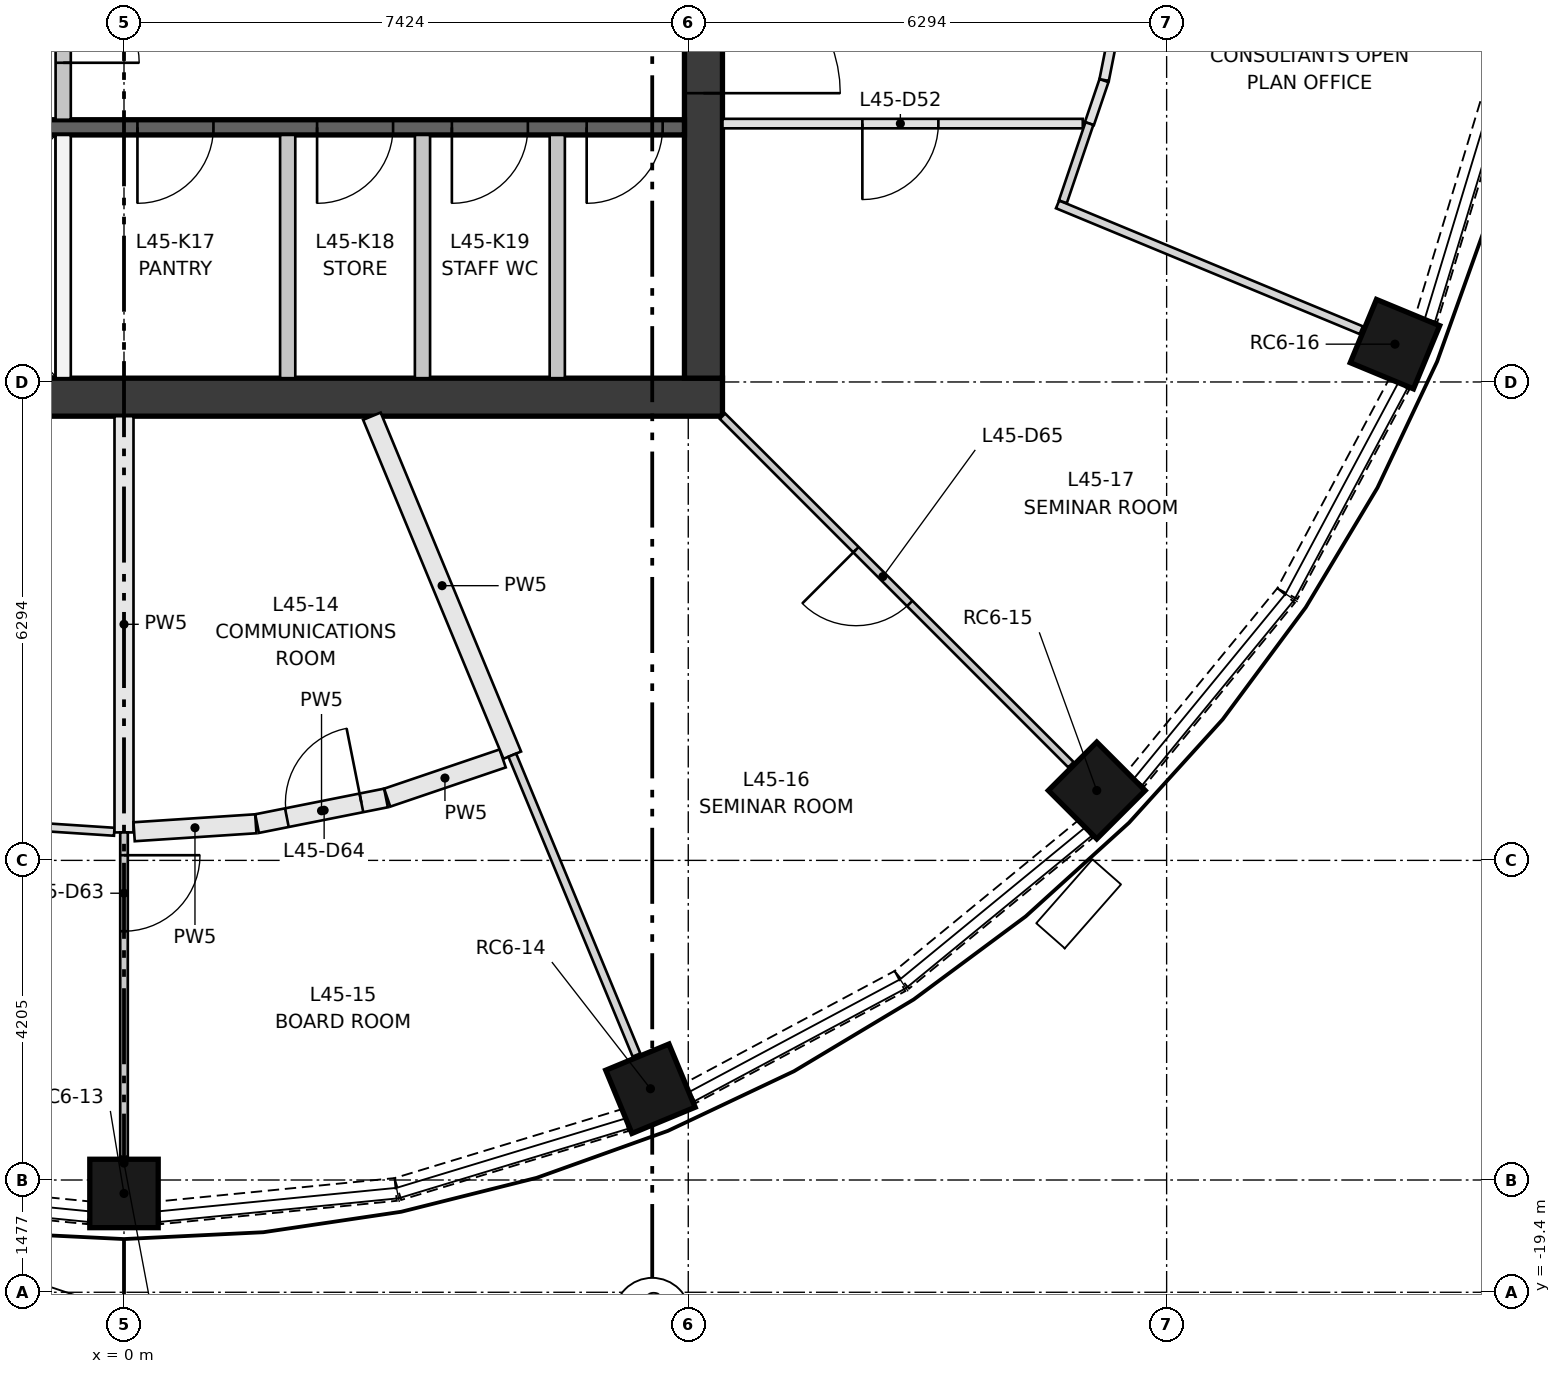
"""IFC4 building model, lengths in metres.
Left out: names, types, materials, properties, quantities, classifications, styles, units other than length and angle.
Written with IfcOpenShell. Run it as: python <this file> out.ifc"""

import sys

from ifc_helpers import new_model, si_unit, direction, frame, frame_2d, origin, origin_2d, place, context, subcontext, project, spatial, rectangle, extrude, element, fill, save


model = new_model("IFC4")
c1 = context("Model", 3, precision=1e-05, world=origin(), true_north=direction((0.0, 1.0)))
c2 = subcontext(c1, "Body", "Model", "MODEL_VIEW")
j1 = project(units=[si_unit("LENGTHUNIT", "METRE"), si_unit("PLANEANGLEUNIT", "RADIAN")], contexts=[c1])
p1 = place(None, origin())
s1 = spatial("IfcSite", under=j1, at=p1, CompositionType="ELEMENT")
p2 = place(p1, origin())
s2 = spatial("IfcBuilding", under=s1, at=p2, CompositionType="ELEMENT")
p3 = place(p2, frame((0.0, 0.0, 170.9)))
s3 = spatial("IfcBuildingStorey", under=s2, at=p3, CompositionType="ELEMENT", Elevation=170.9)
for number, where, z_axis, x_axis in (
    (1, (0.0, -18.1, 0.0), (0.0, 0.0, 1.0), (0.0, -1.0, 0.0)),
    (2, (6.927, -16.722, 0.0), (0.0, 0.0, 1.0), (0.383, -0.924, 0.0)),
    (3, (12.799, -12.799, 0.0), (0.0, 0.0, 1.0), (0.707, -0.707, 0.0)),
    (4, (16.722, -6.927, 0.0), (0.0, 0.0, 1.0), (0.924, -0.383, 0.0)),
):
    element("IfcColumn", number, at=place(p3, frame(where, z_axis=z_axis, x_axis=x_axis)), inside=s3, PredefinedType="COLUMN", context=c2, shape_type="SweptSolid", body=[
        extrude(rectangle(XDim=0.9, YDim=0.9, at=origin_2d()), origin(), (0.0, 0.0, 1.0), 3.35),
    ])
p4 = place(p3, frame((-7.874, -7.624, 0.0), z_axis=(0.0, 0.0, 1.0), x_axis=(1.0, 0.0, 0.0)))
e5 = element("IfcWall", 5, at=p4, inside=s3, PredefinedType="SHEAR", context=c2, shape_type="SweptSolid", body=[
    extrude(rectangle(XDim=15.748, YDim=0.5, at=frame_2d((7.874, 0.0))), origin(), (0.0, 0.0, 1.0), 3.35),
])
p5 = place(p3, frame((7.624, -7.374, 0.0), z_axis=(0.0, 0.0, 1.0), x_axis=(0.0, 1.0, 0.0)))
e6 = element("IfcWall", 6, at=p5, inside=s3, PredefinedType="SHEAR", context=c2, shape_type="SweptSolid", body=[
    extrude(rectangle(XDim=14.748, YDim=0.5, at=frame_2d((7.374, 0.0))), origin(), (0.0, 0.0, 1.0), 3.35),
])
p6 = place(p5, frame((6.874, 0.0, 0.0)))
e7 = element("IfcOpeningElement", 7, at=p6, cuts=e6, PredefinedType="OPENING", context=c2, shape_type="SweptSolid", body=[
    extrude(rectangle(XDim=1.0, YDim=2.1, at=frame_2d((0.5, 1.05))), frame((0.0, 0.26, 0.0), z_axis=(0.0, -1.0, 0.0), x_axis=(1.0, 0.0, 0.0)), (0.0, 0.0, 1.0), 0.52),
])
p7 = place(p5, frame((3.75, 0.0, 0.0)))
e8 = element("IfcOpeningElement", 8, at=p7, cuts=e6, PredefinedType="OPENING", context=c2, shape_type="SweptSolid", body=[
    extrude(rectangle(XDim=1.8, YDim=2.1, at=frame_2d((0.9, 1.05))), frame((0.0, 0.26, 0.0), z_axis=(0.0, -1.0, 0.0), x_axis=(1.0, 0.0, 0.0)), (0.0, 0.0, 1.0), 0.52),
])
p8 = place(p5, frame((9.198, 0.0, 0.0)))
e9 = element("IfcOpeningElement", 9, at=p8, cuts=e6, PredefinedType="OPENING", context=c2, shape_type="SweptSolid", body=[
    extrude(rectangle(XDim=1.8, YDim=2.1, at=frame_2d((0.9, 1.05))), frame((0.0, 0.26, 0.0), z_axis=(0.0, -1.0, 0.0), x_axis=(1.0, 0.0, 0.0)), (0.0, 0.0, 1.0), 0.52),
])
p9 = place(p3, frame((-7.374, -4.074, 0.0), z_axis=(0.0, 0.0, 1.0), x_axis=(1.0, 0.0, 0.0)))
e10 = element("IfcWall", 10, at=p9, inside=s3, PredefinedType="SHEAR", context=c2, shape_type="SweptSolid", body=[
    extrude(rectangle(XDim=14.748, YDim=0.2, at=frame_2d((7.374, 0.0))), origin(), (0.0, 0.0, 1.0), 3.0),
])
p10 = place(p9, frame((1.319, 0.0, 0.0)))
e11 = element("IfcOpeningElement", 11, at=p10, cuts=e10, PredefinedType="OPENING", context=c2, shape_type="SweptSolid", body=[
    extrude(rectangle(XDim=1.1, YDim=2.1, at=frame_2d((0.55, 1.05))), frame((0.0, 0.11, 0.0), z_axis=(0.0, -1.0, 0.0), x_axis=(1.0, 0.0, 0.0)), (0.0, 0.0, 1.0), 0.22),
])
p11 = place(p9, frame((4.456, 0.0, 0.0)))
e12 = element("IfcOpeningElement", 12, at=p11, cuts=e10, PredefinedType="OPENING", context=c2, shape_type="SweptSolid", body=[
    extrude(rectangle(XDim=1.1, YDim=2.1, at=frame_2d((0.55, 1.05))), frame((0.0, 0.11, 0.0), z_axis=(0.0, -1.0, 0.0), x_axis=(1.0, 0.0, 0.0)), (0.0, 0.0, 1.0), 0.22),
])
p12 = place(p9, frame((7.551, 0.0, 0.0)))
e13 = element("IfcOpeningElement", 13, at=p12, cuts=e10, PredefinedType="OPENING", context=c2, shape_type="SweptSolid", body=[
    extrude(rectangle(XDim=1.0, YDim=2.1, at=frame_2d((0.5, 1.05))), frame((0.0, 0.11, 0.0), z_axis=(0.0, -1.0, 0.0), x_axis=(1.0, 0.0, 0.0)), (0.0, 0.0, 1.0), 0.22),
])
p13 = place(p9, frame((9.914, 0.0, 0.0)))
e14 = element("IfcOpeningElement", 14, at=p13, cuts=e10, PredefinedType="OPENING", context=c2, shape_type="SweptSolid", body=[
    extrude(rectangle(XDim=1.0, YDim=2.1, at=frame_2d((0.5, 1.05))), frame((0.0, 0.11, 0.0), z_axis=(0.0, -1.0, 0.0), x_axis=(1.0, 0.0, 0.0)), (0.0, 0.0, 1.0), 0.22),
])
p14 = place(p9, frame((11.688, 0.0, 0.0)))
e15 = element("IfcOpeningElement", 15, at=p14, cuts=e10, PredefinedType="OPENING", context=c2, shape_type="SweptSolid", body=[
    extrude(rectangle(XDim=1.0, YDim=2.1, at=frame_2d((0.5, 1.05))), frame((0.0, 0.11, 0.0), z_axis=(0.0, -1.0, 0.0), x_axis=(1.0, 0.0, 0.0)), (0.0, 0.0, 1.0), 0.22),
])
p15 = place(p9, frame((13.461, 0.0, 0.0)))
e16 = element("IfcOpeningElement", 16, at=p15, cuts=e10, PredefinedType="OPENING", context=c2, shape_type="SweptSolid", body=[
    extrude(rectangle(XDim=1.0, YDim=2.1, at=frame_2d((0.5, 1.05))), frame((0.0, 0.11, 0.0), z_axis=(0.0, -1.0, 0.0), x_axis=(1.0, 0.0, 0.0)), (0.0, 0.0, 1.0), 0.22),
])
p16 = place(p3, frame((-0.8, -7.374, 0.0), z_axis=(0.0, 0.0, 1.0), x_axis=(0.0, 1.0, 0.0)))
e17 = element("IfcWall", 17, at=p16, inside=s3, PredefinedType="PARTITIONING", context=c2, shape_type="SweptSolid", body=[
    extrude(rectangle(XDim=3.2, YDim=0.2, at=frame_2d((1.6, 0.0))), origin(), (0.0, 0.0, 1.0), 3.0),
])
p17 = place(p3, frame((-0.8, -3.974, 0.0), z_axis=(0.0, 0.0, 1.0), x_axis=(0.0, 1.0, 0.0)))
e18 = element("IfcWall", 18, at=p17, inside=s3, PredefinedType="PARTITIONING", context=c2, shape_type="SweptSolid", body=[
    extrude(rectangle(XDim=2.499, YDim=0.2, at=frame_2d((1.25, 0.0))), origin(), (0.0, 0.0, 1.0), 3.0),
])
p18 = place(p17, frame((0.75, 0.0, 0.0)))
e19 = element("IfcOpeningElement", 19, at=p18, cuts=e18, PredefinedType="OPENING", context=c2, shape_type="SweptSolid", body=[
    extrude(rectangle(XDim=1.0, YDim=2.1, at=frame_2d((0.5, 1.05))), frame((0.0, 0.11, 0.0), z_axis=(0.0, -1.0, 0.0), x_axis=(1.0, 0.0, 0.0)), (0.0, 0.0, 1.0), 0.22),
])
for number, where, z_axis, x_axis in (
    (20, (2.154, -7.374, 0.0), (0.0, 0.0, 1.0), (0.0, 1.0, 0.0)),
    (21, (3.927, -7.374, 0.0), (0.0, 0.0, 1.0), (0.0, 1.0, 0.0)),
    (22, (5.7, -7.374, 0.0), (0.0, 0.0, 1.0), (0.0, 1.0, 0.0)),
):
    element("IfcWall", number, at=place(p3, frame(where, z_axis=z_axis, x_axis=x_axis)), inside=s3, PredefinedType="PARTITIONING", context=c2, shape_type="SweptSolid", body=[
        extrude(rectangle(XDim=3.2, YDim=0.2, at=frame_2d((1.6, 0.0))), origin(), (0.0, 0.0, 1.0), 3.0),
    ])
for number, where, z_axis, x_axis in (
    (23, (-3.574, -18.048, 0.0), (0.0, 0.0, 1.0), (0.995, -0.098, 0.0)),
    (24, (0.464, -18.354, 0.0), (0.0, 0.0, 1.0), (0.995, 0.098, 0.0)),
):
    element("IfcWall", number, at=place(p3, frame(where, z_axis=z_axis, x_axis=x_axis)), inside=s3, PredefinedType="SOLIDWALL", context=c2, shape_type="SweptSolid", body=[
        extrude(rectangle(XDim=3.125, YDim=0.3, at=frame_2d((1.563, 0.0))), origin(), (0.0, 0.0, 1.0), 0.9),
    ])
p19 = place(p3, frame((3.604, -18.042, 0.0), z_axis=(0.0, 0.0, 1.0), x_axis=(0.957001416136, 0.290083245834, 0.0)))
e25 = element("IfcWall", 25, at=p19, inside=s3, PredefinedType="SOLIDWALL", context=c2, shape_type="SweptSolid", body=[
    extrude(rectangle(XDim=3.127, YDim=0.3, at=frame_2d((1.563, 0.0))), origin(), (0.0, 0.0, 1.0), 0.9),
])
p20 = place(p3, frame((7.452, -16.779, 0.0), z_axis=(0.0, 0.0, 1.0), x_axis=(0.882024038027, 0.47120441036, 0.0)))
e26 = element("IfcWall", 26, at=p20, inside=s3, PredefinedType="SOLIDWALL", context=c2, shape_type="SweptSolid", body=[
    extrude(rectangle(XDim=3.125, YDim=0.3, at=frame_2d((1.562, 0.0))), origin(), (0.0, 0.0, 1.0), 0.9),
])
for number, where, z_axis, x_axis in (
    (27, (10.234, -15.29, 0.0), (0.0, 0.0, 1.0), (0.773, 0.634, 0.0)),
    (28, (13.306, -12.651, 0.0), (0.0, 0.0, 1.0), (0.634, 0.773, 0.0)),
):
    element("IfcWall", number, at=place(p3, frame(where, z_axis=z_axis, x_axis=x_axis)), inside=s3, PredefinedType="SOLIDWALL", context=c2, shape_type="SweptSolid", body=[
        extrude(rectangle(XDim=3.127, YDim=0.3, at=frame_2d((1.563, 0.0))), origin(), (0.0, 0.0, 1.0), 0.9),
    ])
p21 = place(p3, frame((15.306, -10.209, 0.0), z_axis=(0.0, 0.0, 1.0), x_axis=(0.47120441036, 0.882024038027, 0.0)))
e29 = element("IfcWall", 29, at=p21, inside=s3, PredefinedType="SOLIDWALL", context=c2, shape_type="SweptSolid", body=[
    extrude(rectangle(XDim=3.125, YDim=0.3, at=frame_2d((1.562, 0.0))), origin(), (0.0, 0.0, 1.0), 0.9),
])
p22 = place(p3, frame((17.135, -6.596, 0.0), z_axis=(0.0, 0.0, 1.0), x_axis=(0.290083245834, 0.957001416136, 0.0)))
e30 = element("IfcWall", 30, at=p22, inside=s3, PredefinedType="SOLIDWALL", context=c2, shape_type="SweptSolid", body=[
    extrude(rectangle(XDim=3.127, YDim=0.3, at=frame_2d((1.563, 0.0))), origin(), (0.0, 0.0, 1.0), 0.9),
])
p23 = place(p3, frame((12.615, -4.024, 0.0), z_axis=(0.0, 0.0, 1.0), x_axis=(-1.0, 0.0, 0.0)))
e31 = element("IfcWall", 31, at=p23, inside=s3, PredefinedType="PARTITIONING", context=c2, shape_type="SweptSolid", body=[
    extrude(rectangle(XDim=4.741, YDim=0.125, at=frame_2d((2.37, 0.0))), origin(), (0.0, 0.0, 1.0), 3.0),
])
p24 = place(p23, frame((1.9, 0.0, 0.0)))
e32 = element("IfcOpeningElement", 32, at=p24, cuts=e31, PredefinedType="OPENING", context=c2, shape_type="SweptSolid", body=[
    extrude(rectangle(XDim=1.0, YDim=2.1, at=frame_2d((0.5, 1.05))), frame((0.0, 0.073, 0.0), z_axis=(0.0, -1.0, 0.0), x_axis=(1.0, 0.0, 0.0)), (0.0, 0.0, 1.0), 0.145),
])
p25 = place(p3, frame((12.894, -3.459, 0.0), z_axis=(0.0, 0.0, 1.0), x_axis=(-0.321374914787, -0.946952038989, 0.0)))
e33 = element("IfcWall", 33, at=p25, inside=s3, PredefinedType="PARTITIONING", context=c2, shape_type="SweptSolid", body=[
    extrude(rectangle(XDim=0.597, YDim=0.125, at=frame_2d((0.299, 0.0))), origin(), (0.0, 0.0, 1.0), 3.0),
])
p26 = place(p3, frame((13.235, -1.747, 0.0), z_axis=(0.0, 0.0, 1.0), x_axis=(-0.195116516296, -0.980780069673, 0.0)))
e34 = element("IfcWall", 34, at=p26, inside=s3, PredefinedType="PARTITIONING", context=c2, shape_type="SweptSolid", body=[
    extrude(rectangle(XDim=1.738, YDim=0.125, at=frame_2d((0.869, 0.0))), origin(), (0.0, 0.0, 1.0), 3.0),
])
p27 = place(p3, frame((-0.128, -13.342, 0.0), z_axis=(0.0, 0.0, 1.0), x_axis=(-0.997862773684, 0.065344356258, 0.0)))
e35 = element("IfcWall", 35, at=p27, inside=s3, PredefinedType="PARTITIONING", context=c2, shape_type="SweptSolid", body=[
    extrude(rectangle(XDim=1.614, YDim=0.105, at=frame_2d((0.807, 0.0))), origin(), (0.0, 0.0, 1.0), 3.0),
])
p28 = place(p3, frame((0.0, -7.874, 0.0), z_axis=(0.0, 0.0, 1.0), x_axis=(0.0, -1.0, 0.0)))
e36 = element("IfcWall", 36, at=p28, inside=s3, PredefinedType="PARTITIONING", context=c2, shape_type="SweptSolid", body=[
    extrude(rectangle(XDim=5.476, YDim=0.25, at=frame_2d((2.738, 0.0))), origin(), (0.0, 0.0, 1.0), 3.0),
])
p29 = place(p3, frame((0.0, -13.35, 0.0), z_axis=(0.0, 0.0, 1.0), x_axis=(0.0, -1.0, 0.0)))
e37 = element("IfcWall", 37, at=p29, inside=s3, PredefinedType="PARTITIONING", context=c2, shape_type="SweptSolid", body=[
    extrude(rectangle(XDim=4.27, YDim=0.1, at=frame_2d((2.135, 0.0))), origin(), (0.0, 0.0, 1.0), 3.0),
])
p30 = place(p29, frame((0.3, 0.0, 0.0)))
e38 = element("IfcOpeningElement", 38, at=p30, cuts=e37, PredefinedType="OPENING", context=c2, shape_type="SweptSolid", body=[
    extrude(rectangle(XDim=1.0, YDim=2.1, at=frame_2d((0.5, 1.05))), frame((0.0, 0.06, 0.0), z_axis=(0.0, -1.0, 0.0), x_axis=(1.0, 0.0, 0.0)), (0.0, 0.0, 1.0), 0.12),
])
p31 = place(p3, frame((1.734, -13.236, 0.0), z_axis=(0.0, 0.0, 1.0), x_axis=(-0.997857274773, -0.065428275107, 0.0)))
e39 = element("IfcWall", 39, at=p31, inside=s3, PredefinedType="PARTITIONING", context=c2, shape_type="SweptSolid", body=[
    extrude(rectangle(XDim=1.604, YDim=0.25, at=frame_2d((0.802, 0.0))), origin(), (0.0, 0.0, 1.0), 3.0),
])
p32 = place(p3, frame((1.75, -13.234, 0.0), z_axis=(0.0, 0.0, 1.0), x_axis=(0.98079718542, 0.195030461907, 0.0)))
e40 = element("IfcWall", 40, at=p32, inside=s3, PredefinedType="PARTITIONING", context=c2, shape_type="SweptSolid", body=[
    extrude(rectangle(XDim=1.73, YDim=0.25, at=frame_2d((0.865, 0.0))), origin(), (0.0, 0.0, 1.0), 3.0),
])
p33 = place(p32, frame((0.4, 0.0, 0.0)))
e41 = element("IfcOpeningElement", 41, at=p33, cuts=e40, PredefinedType="OPENING", context=c2, shape_type="SweptSolid", body=[
    extrude(rectangle(XDim=1.0, YDim=2.1, at=frame_2d((0.5, 1.05))), frame((0.0, 0.135, 0.0), z_axis=(0.0, -1.0, 0.0), x_axis=(1.0, 0.0, 0.0)), (0.0, 0.0, 1.0), 0.27),
])
p34 = place(p3, frame((4.982, -12.377, 0.0), z_axis=(0.0, 0.0, 1.0), x_axis=(-0.946919168061, -0.321471754838, 0.0)))
e42 = element("IfcWall", 42, at=p34, inside=s3, PredefinedType="PARTITIONING", context=c2, shape_type="SweptSolid", body=[
    extrude(rectangle(XDim=1.605, YDim=0.25, at=frame_2d((0.802, 0.0))), origin(), (0.0, 0.0, 1.0), 3.0),
])
p35 = place(p3, frame((3.261, -7.874, 0.0), z_axis=(0.0, 0.0, 1.0), x_axis=(0.382707643949, -0.923869503373, 0.0)))
e43 = element("IfcWall", 43, at=p35, inside=s3, PredefinedType="PARTITIONING", context=c2, shape_type="SweptSolid", body=[
    extrude(rectangle(XDim=4.827, YDim=0.25, at=frame_2d((2.414, 0.0))), origin(), (0.0, 0.0, 1.0), 3.0),
])
p36 = place(p3, frame((5.109, -12.334, 0.0), z_axis=(0.0, 0.0, 1.0), x_axis=(0.382669916503, -0.923885130849, 0.0)))
e44 = element("IfcWall", 44, at=p36, inside=s3, PredefinedType="PARTITIONING", context=c2, shape_type="SweptSolid", body=[
    extrude(rectangle(XDim=4.27, YDim=0.11, at=frame_2d((2.135, 0.0))), origin(), (0.0, 0.0, 1.0), 3.0),
])
p37 = place(p3, frame((12.459, -12.459, 0.0), z_axis=(0.0, 0.0, 1.0), x_axis=(-0.707106781187, 0.707106781187, 0.0)))
e45 = element("IfcWall", 45, at=p37, inside=s3, PredefinedType="PARTITIONING", context=c2, shape_type="SweptSolid", body=[
    extrude(rectangle(XDim=6.484, YDim=0.1, at=frame_2d((3.242, 0.0))), origin(), (0.0, 0.0, 1.0), 3.0),
])
p38 = place(p37, frame((3.0, 0.0, 0.0)))
e46 = element("IfcOpeningElement", 46, at=p38, cuts=e45, PredefinedType="OPENING", context=c2, shape_type="SweptSolid", body=[
    extrude(rectangle(XDim=1.0, YDim=2.1, at=frame_2d((0.5, 1.05))), frame((0.0, 0.06, 0.0), z_axis=(0.0, -1.0, 0.0), x_axis=(1.0, 0.0, 0.0)), (0.0, 0.0, 1.0), 0.12),
])
p39 = place(p3, frame((12.283, -5.088, 0.0), z_axis=(0.0, 0.0, 1.0), x_axis=(0.923888181348, -0.382662551559, 0.0)))
e47 = element("IfcWall", 47, at=p39, inside=s3, PredefinedType="PARTITIONING", context=c2, shape_type="SweptSolid", body=[
    extrude(rectangle(XDim=4.325, YDim=0.11, at=frame_2d((2.163, 0.0))), origin(), (0.0, 0.0, 1.0), 3.0),
])
p40 = place(p3, frame((12.702, -4.024, 0.0), z_axis=(0.0, 0.0, 1.0), x_axis=(-0.321346724307, -0.946961605756, 0.0)))
e48 = element("IfcWall", 48, at=p40, inside=s3, PredefinedType="PARTITIONING", context=c2, shape_type="SweptSolid", body=[
    extrude(rectangle(XDim=1.086, YDim=0.11, at=frame_2d((0.543, 0.0))), origin(), (0.0, 0.0, 1.0), 3.0),
])
p41 = place(p18, frame((1.0, 0.0, 0.0), z_axis=(0.0, 0.0, 1.0), x_axis=(-1.0, 0.0, 0.0)))
e49 = element("IfcDoor", 49, at=p41, inside=s3, OperationType="SINGLE_SWING_LEFT", PredefinedType="DOOR", context=c2, shape_type="SweptSolid", body=[
    extrude(rectangle(XDim=1.0, YDim=2.1, at=frame_2d((0.5, 1.05))), frame((0.0, 0.025, 0.0), z_axis=(0.0, -1.0, 0.0), x_axis=(1.0, 0.0, 0.0)), (0.0, 0.0, 1.0), 0.05),
])
fill(e19, e49)
p42 = place(p12, frame((1.0, 0.0, 0.0), z_axis=(0.0, 0.0, 1.0), x_axis=(-1.0, 0.0, 0.0)))
e50 = element("IfcDoor", 50, at=p42, inside=s3, OperationType="SINGLE_SWING_LEFT", PredefinedType="DOOR", context=c2, shape_type="SweptSolid", body=[
    extrude(rectangle(XDim=1.0, YDim=2.1, at=frame_2d((0.5, 1.05))), frame((0.0, 0.025, 0.0), z_axis=(0.0, -1.0, 0.0), x_axis=(1.0, 0.0, 0.0)), (0.0, 0.0, 1.0), 0.05),
])
fill(e13, e50)
p43 = place(p13, frame((1.0, 0.0, 0.0), z_axis=(0.0, 0.0, 1.0), x_axis=(-1.0, 0.0, 0.0)))
e51 = element("IfcDoor", 51, at=p43, inside=s3, OperationType="SINGLE_SWING_LEFT", PredefinedType="DOOR", context=c2, shape_type="SweptSolid", body=[
    extrude(rectangle(XDim=1.0, YDim=2.1, at=frame_2d((0.5, 1.05))), frame((0.0, 0.025, 0.0), z_axis=(0.0, -1.0, 0.0), x_axis=(1.0, 0.0, 0.0)), (0.0, 0.0, 1.0), 0.05),
])
fill(e14, e51)
p44 = place(p14, frame((1.0, 0.0, 0.0), z_axis=(0.0, 0.0, 1.0), x_axis=(-1.0, 0.0, 0.0)))
e52 = element("IfcDoor", 52, at=p44, inside=s3, OperationType="SINGLE_SWING_LEFT", PredefinedType="DOOR", context=c2, shape_type="SweptSolid", body=[
    extrude(rectangle(XDim=1.0, YDim=2.1, at=frame_2d((0.5, 1.05))), frame((0.0, 0.025, 0.0), z_axis=(0.0, -1.0, 0.0), x_axis=(1.0, 0.0, 0.0)), (0.0, 0.0, 1.0), 0.05),
])
fill(e15, e52)
p45 = place(p15, frame((1.0, 0.0, 0.0), z_axis=(0.0, 0.0, 1.0), x_axis=(-1.0, 0.0, 0.0)))
e53 = element("IfcDoor", 53, at=p45, inside=s3, OperationType="SINGLE_SWING_LEFT", PredefinedType="DOOR", context=c2, shape_type="SweptSolid", body=[
    extrude(rectangle(XDim=1.0, YDim=2.1, at=frame_2d((0.5, 1.05))), frame((0.0, 0.025, 0.0), z_axis=(0.0, -1.0, 0.0), x_axis=(1.0, 0.0, 0.0)), (0.0, 0.0, 1.0), 0.05),
])
fill(e16, e53)
p46 = place(p7, frame((1.8, 0.0, 0.0), z_axis=(0.0, 0.0, 1.0), x_axis=(-1.0, 0.0, 0.0)))
e54 = element("IfcDoor", 54, at=p46, inside=s3, OperationType="DOUBLE_DOOR_SINGLE_SWING", PredefinedType="DOOR", context=c2, shape_type="SweptSolid", body=[
    extrude(rectangle(XDim=1.8, YDim=2.1, at=frame_2d((0.9, 1.05))), frame((0.0, 0.025, 0.0), z_axis=(0.0, -1.0, 0.0), x_axis=(1.0, 0.0, 0.0)), (0.0, 0.0, 1.0), 0.05),
])
fill(e8, e54)
p47 = place(p24, origin())
e55 = element("IfcDoor", 55, at=p47, inside=s3, OperationType="SINGLE_SWING_RIGHT", PredefinedType="DOOR", context=c2, shape_type="SweptSolid", body=[
    extrude(rectangle(XDim=1.0, YDim=2.1, at=frame_2d((0.5, 1.05))), frame((0.0, 0.025, 0.0), z_axis=(0.0, -1.0, 0.0), x_axis=(1.0, 0.0, 0.0)), (0.0, 0.0, 1.0), 0.05),
])
fill(e32, e55)
p48 = place(p30, origin())
e56 = element("IfcDoor", 56, at=p48, inside=s3, OperationType="SINGLE_SWING_LEFT", PredefinedType="DOOR", context=c2, shape_type="SweptSolid", body=[
    extrude(rectangle(XDim=1.0, YDim=2.1, at=frame_2d((0.5, 1.05))), frame((0.0, 0.025, 0.0), z_axis=(0.0, -1.0, 0.0), x_axis=(1.0, 0.0, 0.0)), (0.0, 0.0, 1.0), 0.05),
])
fill(e38, e56)
p49 = place(p33, origin())
e57 = element("IfcDoor", 57, at=p49, inside=s3, OperationType="SINGLE_SWING_RIGHT", PredefinedType="DOOR", context=c2, shape_type="SweptSolid", body=[
    extrude(rectangle(XDim=1.0, YDim=2.1, at=frame_2d((0.5, 1.05))), frame((0.0, 0.025, 0.0), z_axis=(0.0, -1.0, 0.0), x_axis=(1.0, 0.0, 0.0)), (0.0, 0.0, 1.0), 0.05),
])
fill(e41, e57)
p50 = place(p38, origin())
e58 = element("IfcDoor", 58, at=p50, inside=s3, OperationType="SINGLE_SWING_RIGHT", PredefinedType="DOOR", context=c2, shape_type="SweptSolid", body=[
    extrude(rectangle(XDim=1.0, YDim=2.1, at=frame_2d((0.5, 1.05))), frame((0.0, 0.025, 0.0), z_axis=(0.0, -1.0, 0.0), x_axis=(1.0, 0.0, 0.0)), (0.0, 0.0, 1.0), 0.05),
])
fill(e46, e58)
save(model, sys.argv[1])
